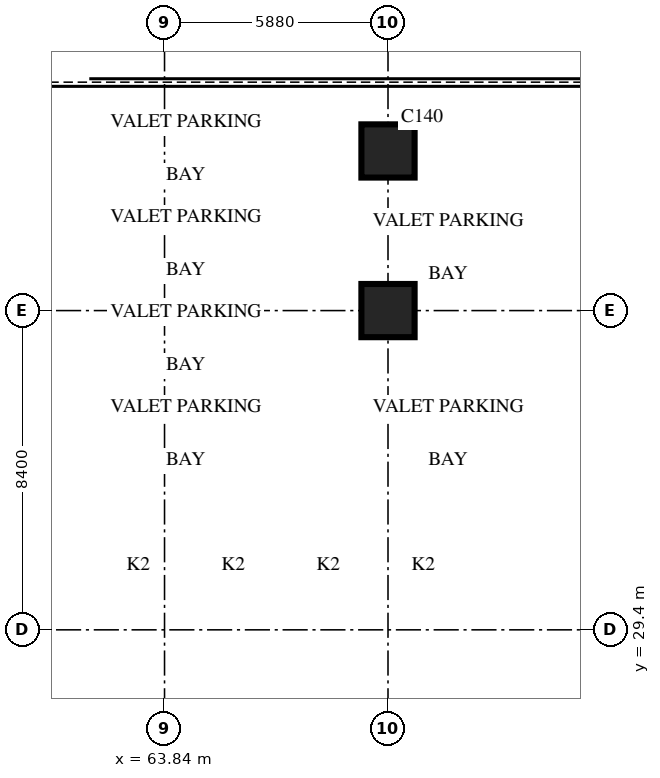
"""IFC4 building model, lengths in metres.
Left out: names, types, materials, properties, quantities, classifications, styles, units other than length and angle.
Written with IfcOpenShell. Run it as: python <this file> out.ifc"""

import sys

from ifc_helpers import new_model, si_unit, direction, frame, origin, origin_2d, place, context, subcontext, project, spatial, rectangle, extrude, source, transform, mapped, element, save


model = new_model("IFC4")
c1 = context("Model", 3, precision=1e-05, world=origin(), true_north=direction((0.0, 1.0)))
c2 = subcontext(c1, "Body", "Model", "MODEL_VIEW")
j1 = project(units=[si_unit("LENGTHUNIT", "METRE"), si_unit("PLANEANGLEUNIT", "RADIAN")], contexts=[c1])
p1 = place(None, origin())
s1 = spatial("IfcSite", under=j1, at=p1, CompositionType="ELEMENT")
p2 = place(p1, origin())
s2 = spatial("IfcBuilding", under=s1, at=p2, CompositionType="ELEMENT")
p3 = place(p2, frame((0.0, 0.0, -4.5)))
s3 = spatial("IfcBuildingStorey", under=s2, at=p3, CompositionType="ELEMENT", Elevation=-4.5)
m1 = source(origin(), c2, "Body", "SweptSolid", [
    extrude(rectangle(XDim=1.4, YDim=1.4, at=origin_2d()), origin(), (0.0, 0.0, 1.0), 4.5),
])
for number, where, z_axis, x_axis in (
    (1, (69.72, 37.8, 0.0), (0.0, 0.0, 1.0), (1.0, 0.0, 0.0)),
    (2, (69.72, 42.0, 0.0), (0.0, 0.0, 1.0), (1.0, 0.0, 0.0)),
):
    element("IfcColumn", number, at=place(p3, frame(where, z_axis=z_axis, x_axis=x_axis)), inside=s3, PredefinedType="COLUMN", context=c2, shape_type="MappedRepresentation", body=[
        mapped(m1, transform((0.0, 0.0, 0.0), scale=1.0)),
    ])
save(model, sys.argv[1])
